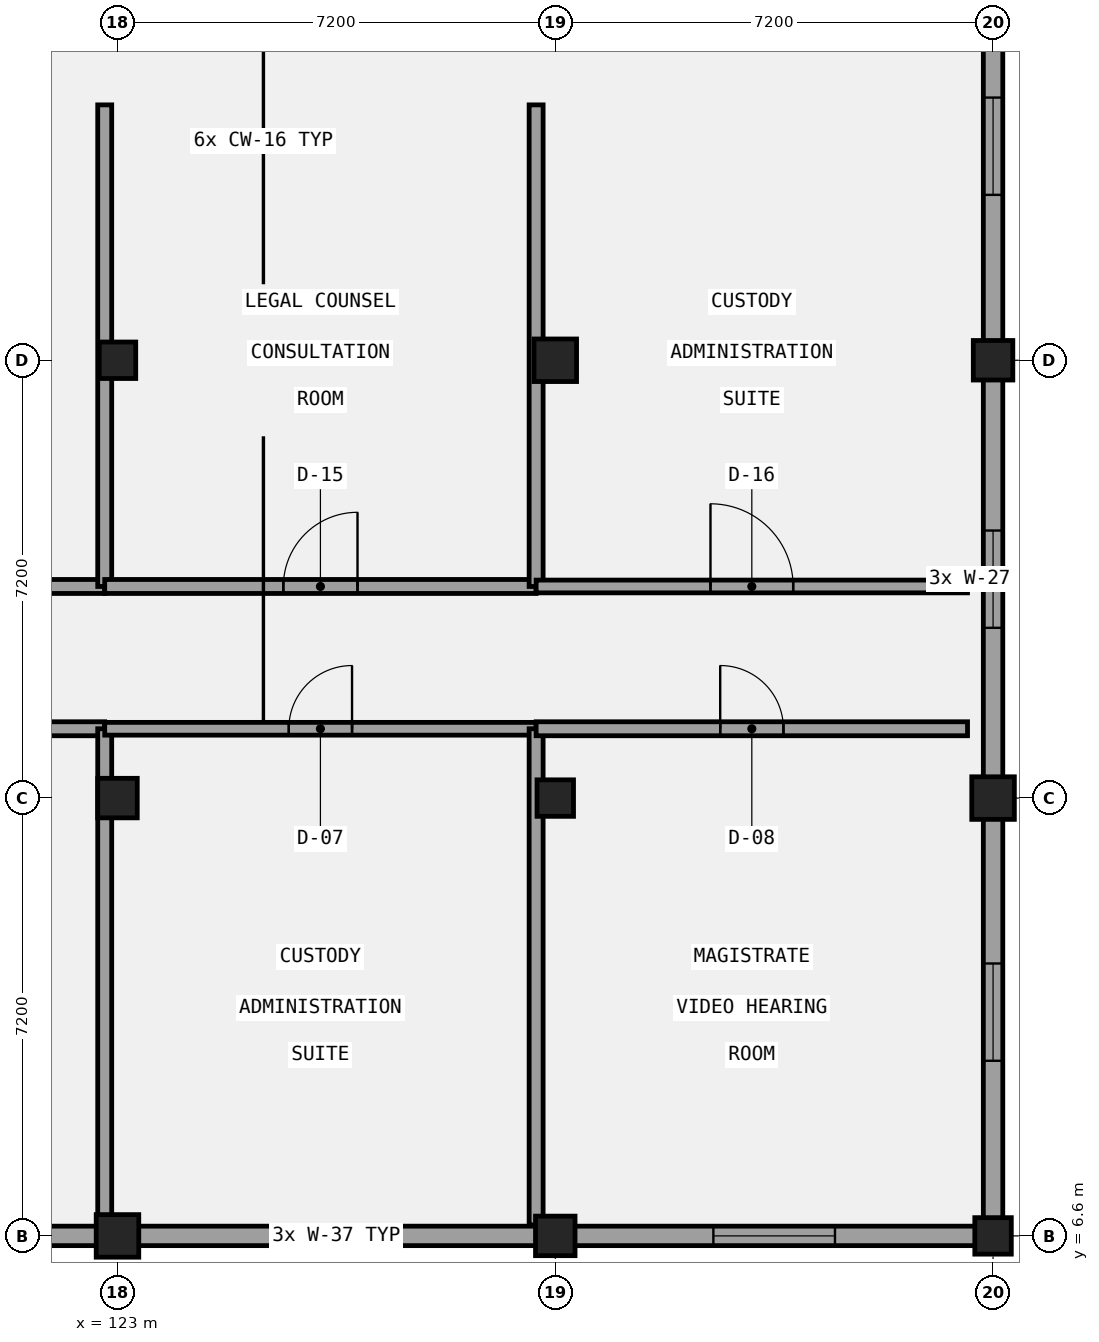
"""IFC4 building model, lengths in metres.
Left out: names, types, materials, properties, quantities, classifications, styles, units other than length and angle.
Written with IfcOpenShell. Run it as: python <this file> out.ifc"""

import sys

from ifc_helpers import new_model, si_unit, direction, frame, frame_2d, origin, origin_2d, place, context, subcontext, project, spatial, rectangle, extrude, element, fill, save


model = new_model("IFC4")
c1 = context("Model", 3, precision=1e-05, world=origin(), true_north=direction((0.0, 1.0)))
c2 = subcontext(c1, "Body", "Model", "MODEL_VIEW")
j1 = project(units=[si_unit("LENGTHUNIT", "METRE"), si_unit("PLANEANGLEUNIT", "RADIAN")], contexts=[c1])
p1 = place(None, origin())
s1 = spatial("IfcSite", under=j1, at=p1, CompositionType="ELEMENT")
p2 = place(p1, origin())
s2 = spatial("IfcBuilding", under=s1, at=p2, CompositionType="ELEMENT")
p3 = place(p2, frame((0.0, 0.0, 9.6)))
s3 = spatial("IfcBuildingStorey", under=s2, at=p3, CompositionType="ELEMENT", Elevation=9.6)
p4 = place(p3, frame((123.0, 6.6, 0.0), z_axis=(0.0, 0.0, 1.0), x_axis=(1.0, 0.0, 0.0)))
e1 = element("IfcColumn", 1, at=p4, inside=s3, PredefinedType="COLUMN", context=c2, shape_type="SweptSolid", body=[
    extrude(rectangle(XDim=0.7, YDim=0.7, at=origin_2d()), origin(), (0.0, 0.0, 1.0), 4.2),
])
p5 = place(p3, frame((123.0, 13.8, 0.0), z_axis=(0.0, 0.0, 1.0), x_axis=(1.0, 0.0, 0.0)))
e2 = element("IfcColumn", 2, at=p5, inside=s3, PredefinedType="COLUMN", context=c2, shape_type="SweptSolid", body=[
    extrude(rectangle(XDim=0.65, YDim=0.65, at=origin_2d()), origin(), (0.0, 0.0, 1.0), 4.2),
])
p6 = place(p3, frame((123.0, 21.0, 0.0), z_axis=(0.0, 0.0, 1.0), x_axis=(1.0, 0.0, 0.0)))
e3 = element("IfcColumn", 3, at=p6, inside=s3, PredefinedType="COLUMN", context=c2, shape_type="SweptSolid", body=[
    extrude(rectangle(XDim=0.6, YDim=0.6, at=origin_2d()), origin(), (0.0, 0.0, 1.0), 4.2),
])
p7 = place(p3, frame((130.2, 6.6, 0.0), z_axis=(0.0, 0.0, 1.0), x_axis=(1.0, 0.0, 0.0)))
e4 = element("IfcColumn", 4, at=p7, inside=s3, PredefinedType="COLUMN", context=c2, shape_type="SweptSolid", body=[
    extrude(rectangle(XDim=0.65, YDim=0.65, at=origin_2d()), origin(), (0.0, 0.0, 1.0), 4.2),
])
p8 = place(p3, frame((130.2, 13.8, 0.0), z_axis=(0.0, 0.0, 1.0), x_axis=(1.0, 0.0, 0.0)))
e5 = element("IfcColumn", 5, at=p8, inside=s3, PredefinedType="COLUMN", context=c2, shape_type="SweptSolid", body=[
    extrude(rectangle(XDim=0.6, YDim=0.6, at=origin_2d()), origin(), (0.0, 0.0, 1.0), 4.2),
])
p9 = place(p3, frame((130.2, 21.0, 0.0), z_axis=(0.0, 0.0, 1.0), x_axis=(1.0, 0.0, 0.0)))
e6 = element("IfcColumn", 6, at=p9, inside=s3, PredefinedType="COLUMN", context=c2, shape_type="SweptSolid", body=[
    extrude(rectangle(XDim=0.7, YDim=0.7, at=origin_2d()), origin(), (0.0, 0.0, 1.0), 4.2),
])
p10 = place(p3, frame((137.4, 6.6, 0.0), z_axis=(0.0, 0.0, 1.0), x_axis=(1.0, 0.0, 0.0)))
e7 = element("IfcColumn", 7, at=p10, inside=s3, PredefinedType="COLUMN", context=c2, shape_type="SweptSolid", body=[
    extrude(rectangle(XDim=0.6, YDim=0.6, at=origin_2d()), origin(), (0.0, 0.0, 1.0), 4.2),
])
p11 = place(p3, frame((137.4, 13.8, 0.0), z_axis=(0.0, 0.0, 1.0), x_axis=(1.0, 0.0, 0.0)))
e8 = element("IfcColumn", 8, at=p11, inside=s3, PredefinedType="COLUMN", context=c2, shape_type="SweptSolid", body=[
    extrude(rectangle(XDim=0.7, YDim=0.7, at=origin_2d()), origin(), (0.0, 0.0, 1.0), 4.2),
])
p12 = place(p3, frame((137.4, 21.0, 0.0), z_axis=(0.0, 0.0, 1.0), x_axis=(1.0, 0.0, 0.0)))
e9 = element("IfcColumn", 9, at=p12, inside=s3, PredefinedType="COLUMN", context=c2, shape_type="SweptSolid", body=[
    extrude(rectangle(XDim=0.65, YDim=0.65, at=origin_2d()), origin(), (0.0, 0.0, 1.0), 4.2),
])
p13 = place(p3, frame((79.64, 6.6, 0.0), z_axis=(0.0, 0.0, 1.0), x_axis=(1.0, 0.0, 0.0)))
e10 = element("IfcWall", 10, at=p13, inside=s3, PredefinedType="SOLIDWALL", context=c2, shape_type="SweptSolid", body=[
    extrude(rectangle(XDim=57.92, YDim=0.32, at=frame_2d((28.96, 0.0))), origin(), (0.0, 0.0, 1.0), 2.94),
])
p14 = place(p13, frame((2.76, 0.0, 1.0)))
e11 = element("IfcOpeningElement", 11, at=p14, cuts=e10, PredefinedType="OPENING", context=c2, shape_type="SweptSolid", body=[
    extrude(rectangle(XDim=2.0, YDim=1.65, at=frame_2d((1.0, 0.825))), frame((0.0, 0.17, 0.0), z_axis=(0.0, -1.0, 0.0), x_axis=(1.0, 0.0, 0.0)), (0.0, 0.0, 1.0), 0.34),
])
p15 = place(p13, frame((9.96, 0.0, 1.0)))
e12 = element("IfcOpeningElement", 12, at=p15, cuts=e10, PredefinedType="OPENING", context=c2, shape_type="SweptSolid", body=[
    extrude(rectangle(XDim=2.0, YDim=1.65, at=frame_2d((1.0, 0.825))), frame((0.0, 0.17, 0.0), z_axis=(0.0, -1.0, 0.0), x_axis=(1.0, 0.0, 0.0)), (0.0, 0.0, 1.0), 0.34),
])
p16 = place(p13, frame((17.16, 0.0, 1.0)))
e13 = element("IfcOpeningElement", 13, at=p16, cuts=e10, PredefinedType="OPENING", context=c2, shape_type="SweptSolid", body=[
    extrude(rectangle(XDim=2.0, YDim=1.65, at=frame_2d((1.0, 0.825))), frame((0.0, 0.17, 0.0), z_axis=(0.0, -1.0, 0.0), x_axis=(1.0, 0.0, 0.0)), (0.0, 0.0, 1.0), 0.34),
])
p17 = place(p13, frame((24.36, 0.0, 1.0)))
e14 = element("IfcOpeningElement", 14, at=p17, cuts=e10, PredefinedType="OPENING", context=c2, shape_type="SweptSolid", body=[
    extrude(rectangle(XDim=2.0, YDim=1.65, at=frame_2d((1.0, 0.825))), frame((0.0, 0.17, 0.0), z_axis=(0.0, -1.0, 0.0), x_axis=(1.0, 0.0, 0.0)), (0.0, 0.0, 1.0), 0.34),
])
p18 = place(p13, frame((31.56, 0.0, 1.0)))
e15 = element("IfcOpeningElement", 15, at=p18, cuts=e10, PredefinedType="OPENING", context=c2, shape_type="SweptSolid", body=[
    extrude(rectangle(XDim=2.0, YDim=1.65, at=frame_2d((1.0, 0.825))), frame((0.0, 0.17, 0.0), z_axis=(0.0, -1.0, 0.0), x_axis=(1.0, 0.0, 0.0)), (0.0, 0.0, 1.0), 0.34),
])
p19 = place(p13, frame((38.76, 0.0, 1.0)))
e16 = element("IfcOpeningElement", 16, at=p19, cuts=e10, PredefinedType="OPENING", context=c2, shape_type="SweptSolid", body=[
    extrude(rectangle(XDim=2.0, YDim=1.65, at=frame_2d((1.0, 0.825))), frame((0.0, 0.17, 0.0), z_axis=(0.0, -1.0, 0.0), x_axis=(1.0, 0.0, 0.0)), (0.0, 0.0, 1.0), 0.34),
])
p20 = place(p13, frame((45.96, 0.0, 1.0)))
e17 = element("IfcOpeningElement", 17, at=p20, cuts=e10, PredefinedType="OPENING", context=c2, shape_type="SweptSolid", body=[
    extrude(rectangle(XDim=2.0, YDim=1.65, at=frame_2d((1.0, 0.825))), frame((0.0, 0.17, 0.0), z_axis=(0.0, -1.0, 0.0), x_axis=(1.0, 0.0, 0.0)), (0.0, 0.0, 1.0), 0.34),
])
p21 = place(p13, frame((53.16, 0.0, 1.0)))
e18 = element("IfcOpeningElement", 18, at=p21, cuts=e10, PredefinedType="OPENING", context=c2, shape_type="SweptSolid", body=[
    extrude(rectangle(XDim=2.0, YDim=1.65, at=frame_2d((1.0, 0.825))), frame((0.0, 0.17, 0.0), z_axis=(0.0, -1.0, 0.0), x_axis=(1.0, 0.0, 0.0)), (0.0, 0.0, 1.0), 0.34),
])
p22 = place(p3, frame((137.4, 6.76, 0.0), z_axis=(0.0, 0.0, 1.0), x_axis=(0.0, 1.0, 0.0)))
e19 = element("IfcWall", 19, at=p22, inside=s3, PredefinedType="SOLIDWALL", context=c2, shape_type="SweptSolid", body=[
    extrude(rectangle(XDim=21.28, YDim=0.32, at=frame_2d((10.64, 0.0))), origin(), (0.0, 0.0, 1.0), 3.29),
])
p23 = place(p22, frame((2.72, 0.0, 1.0)))
e20 = element("IfcOpeningElement", 20, at=p23, cuts=e19, PredefinedType="OPENING", context=c2, shape_type="SweptSolid", body=[
    extrude(rectangle(XDim=1.6, YDim=1.65, at=frame_2d((0.8, 0.825))), frame((0.0, 0.17, 0.0), z_axis=(0.0, -1.0, 0.0), x_axis=(1.0, 0.0, 0.0)), (0.0, 0.0, 1.0), 0.34),
])
p24 = place(p22, frame((9.84, 0.0, 1.0)))
e21 = element("IfcOpeningElement", 21, at=p24, cuts=e19, PredefinedType="OPENING", context=c2, shape_type="SweptSolid", body=[
    extrude(rectangle(XDim=1.6, YDim=1.65, at=frame_2d((0.8, 0.825))), frame((0.0, 0.17, 0.0), z_axis=(0.0, -1.0, 0.0), x_axis=(1.0, 0.0, 0.0)), (0.0, 0.0, 1.0), 0.34),
])
p25 = place(p22, frame((16.96, 0.0, 1.0)))
e22 = element("IfcOpeningElement", 22, at=p25, cuts=e19, PredefinedType="OPENING", context=c2, shape_type="SweptSolid", body=[
    extrude(rectangle(XDim=1.6, YDim=1.65, at=frame_2d((0.8, 0.825))), frame((0.0, 0.17, 0.0), z_axis=(0.0, -1.0, 0.0), x_axis=(1.0, 0.0, 0.0)), (0.0, 0.0, 1.0), 0.34),
])
p26 = place(p3, frame((115.695, 14.94, 0.0), z_axis=(0.0, 0.0, 1.0), x_axis=(1.0, 0.0, 0.0)))
e23 = element("IfcWall", 23, at=p26, inside=s3, PredefinedType="PARTITIONING", context=c2, shape_type="SweptSolid", body=[
    extrude(rectangle(XDim=7.095, YDim=0.23, at=frame_2d((3.547, 0.0))), origin(), (0.0, 0.0, 1.0), 3.94),
])
p27 = place(p26, frame((3.058, 0.0, 0.0)))
e24 = element("IfcOpeningElement", 24, at=p27, cuts=e23, PredefinedType="OPENING", context=c2, shape_type="SweptSolid", body=[
    extrude(rectangle(XDim=0.98, YDim=2.35, at=frame_2d((0.49, 1.175))), frame((0.0, 0.125, 0.0), z_axis=(0.0, -1.0, 0.0), x_axis=(1.0, 0.0, 0.0)), (0.0, 0.0, 1.0), 0.25),
])
p28 = place(p3, frame((122.79, 6.78, 0.0), z_axis=(0.0, 0.0, 1.0), x_axis=(0.0, 1.0, 0.0)))
e25 = element("IfcWall", 25, at=p28, inside=s3, PredefinedType="PARTITIONING", context=c2, shape_type="SweptSolid", body=[
    extrude(rectangle(XDim=8.16, YDim=0.23, at=frame_2d((4.08, 0.0))), origin(), (0.0, 0.0, 1.0), 2.94),
])
p29 = place(p3, frame((122.79, 14.94, 0.0), z_axis=(0.0, 0.0, 1.0), x_axis=(1.0, 0.0, 0.0)))
e26 = element("IfcWall", 26, at=p29, inside=s3, PredefinedType="PARTITIONING", context=c2, shape_type="SweptSolid", body=[
    extrude(rectangle(XDim=7.095, YDim=0.21, at=frame_2d((3.547, 0.0))), origin(), (0.0, 0.0, 1.0), 3.94),
])
p30 = place(p29, frame((3.028, 0.0, 0.0)))
e27 = element("IfcOpeningElement", 27, at=p30, cuts=e26, PredefinedType="OPENING", context=c2, shape_type="SweptSolid", body=[
    extrude(rectangle(XDim=1.04, YDim=2.1, at=frame_2d((0.52, 1.05))), frame((0.0, 0.115, 0.0), z_axis=(0.0, -1.0, 0.0), x_axis=(1.0, 0.0, 0.0)), (0.0, 0.0, 1.0), 0.23),
])
p31 = place(p3, frame((129.885, 6.78, 0.0), z_axis=(0.0, 0.0, 1.0), x_axis=(0.0, 1.0, 0.0)))
e28 = element("IfcWall", 28, at=p31, inside=s3, PredefinedType="PARTITIONING", context=c2, shape_type="SweptSolid", body=[
    extrude(rectangle(XDim=8.16, YDim=0.23, at=frame_2d((4.08, 0.0))), origin(), (0.0, 0.0, 1.0), 2.94),
])
p32 = place(p3, frame((129.885, 14.94, 0.0), z_axis=(0.0, 0.0, 1.0), x_axis=(1.0, 0.0, 0.0)))
e29 = element("IfcWall", 29, at=p32, inside=s3, PredefinedType="PARTITIONING", context=c2, shape_type="SweptSolid", body=[
    extrude(rectangle(XDim=7.095, YDim=0.23, at=frame_2d((3.547, 0.0))), origin(), (0.0, 0.0, 1.0), 3.94),
])
p33 = place(p32, frame((3.028, 0.0, 0.0)))
e30 = element("IfcOpeningElement", 30, at=p33, cuts=e29, PredefinedType="OPENING", context=c2, shape_type="SweptSolid", body=[
    extrude(rectangle(XDim=1.04, YDim=2.22, at=frame_2d((0.52, 1.11))), frame((0.0, 0.125, 0.0), z_axis=(0.0, -1.0, 0.0), x_axis=(1.0, 0.0, 0.0)), (0.0, 0.0, 1.0), 0.25),
])
p34 = place(p3, frame((115.695, 17.28, 0.0), z_axis=(0.0, 0.0, 1.0), x_axis=(1.0, 0.0, 0.0)))
e31 = element("IfcWall", 31, at=p34, inside=s3, PredefinedType="PARTITIONING", context=c2, shape_type="SweptSolid", body=[
    extrude(rectangle(XDim=7.095, YDim=0.23, at=frame_2d((3.547, 0.0))), origin(), (0.0, 0.0, 1.0), 3.39),
])
p35 = place(p34, frame((2.938, 0.0, 0.0)))
e32 = element("IfcOpeningElement", 32, at=p35, cuts=e31, PredefinedType="OPENING", context=c2, shape_type="SweptSolid", body=[
    extrude(rectangle(XDim=1.22, YDim=2.22, at=frame_2d((0.61, 1.11))), frame((0.0, 0.125, 0.0), z_axis=(0.0, -1.0, 0.0), x_axis=(1.0, 0.0, 0.0)), (0.0, 0.0, 1.0), 0.25),
])
p36 = place(p3, frame((122.79, 17.28, 0.0), z_axis=(0.0, 0.0, 1.0), x_axis=(0.0, 1.0, 0.0)))
e33 = element("IfcWall", 33, at=p36, inside=s3, PredefinedType="PARTITIONING", context=c2, shape_type="SweptSolid", body=[
    extrude(rectangle(XDim=7.92, YDim=0.23, at=frame_2d((3.96, 0.0))), origin(), (0.0, 0.0, 1.0), 2.94),
])
p37 = place(p3, frame((122.79, 17.28, 0.0), z_axis=(0.0, 0.0, 1.0), x_axis=(1.0, 0.0, 0.0)))
e34 = element("IfcWall", 34, at=p37, inside=s3, PredefinedType="PARTITIONING", context=c2, shape_type="SweptSolid", body=[
    extrude(rectangle(XDim=7.095, YDim=0.23, at=frame_2d((3.547, 0.0))), origin(), (0.0, 0.0, 1.0), 3.39),
])
p38 = place(p37, frame((2.938, 0.0, 0.0)))
e35 = element("IfcOpeningElement", 35, at=p38, cuts=e34, PredefinedType="OPENING", context=c2, shape_type="SweptSolid", body=[
    extrude(rectangle(XDim=1.22, YDim=2.35, at=frame_2d((0.61, 1.175))), frame((0.0, 0.125, 0.0), z_axis=(0.0, -1.0, 0.0), x_axis=(1.0, 0.0, 0.0)), (0.0, 0.0, 1.0), 0.25),
])
p39 = place(p3, frame((129.885, 17.28, 0.0), z_axis=(0.0, 0.0, 1.0), x_axis=(0.0, 1.0, 0.0)))
e36 = element("IfcWall", 36, at=p39, inside=s3, PredefinedType="PARTITIONING", context=c2, shape_type="SweptSolid", body=[
    extrude(rectangle(XDim=7.92, YDim=0.23, at=frame_2d((3.96, 0.0))), origin(), (0.0, 0.0, 1.0), 3.34),
])
p40 = place(p3, frame((129.885, 17.28, 0.0), z_axis=(0.0, 0.0, 1.0), x_axis=(1.0, 0.0, 0.0)))
e37 = element("IfcWall", 37, at=p40, inside=s3, PredefinedType="PARTITIONING", context=c2, shape_type="SweptSolid", body=[
    extrude(rectangle(XDim=7.095, YDim=0.21, at=frame_2d((3.547, 0.0))), origin(), (0.0, 0.0, 1.0), 3.39),
])
p41 = place(p40, frame((2.867, 0.0, 0.0)))
e38 = element("IfcOpeningElement", 38, at=p41, cuts=e37, PredefinedType="OPENING", context=c2, shape_type="SweptSolid", body=[
    extrude(rectangle(XDim=1.36, YDim=2.1, at=frame_2d((0.68, 1.05))), frame((0.0, 0.115, 0.0), z_axis=(0.0, -1.0, 0.0), x_axis=(1.0, 0.0, 0.0)), (0.0, 0.0, 1.0), 0.23),
])
p42 = place(p20, origin())
e39 = element("IfcWindow", 39, at=p42, inside=s3, PartitioningType="SINGLE_PANEL", PredefinedType="WINDOW", context=c2, shape_type="SweptSolid", body=[
    extrude(rectangle(XDim=2.0, YDim=1.65, at=frame_2d((1.0, 0.825))), frame((0.0, 0.03, 0.0), z_axis=(0.0, -1.0, 0.0), x_axis=(1.0, 0.0, 0.0)), (0.0, 0.0, 1.0), 0.06),
])
fill(e17, e39)
p43 = place(p21, origin())
e40 = element("IfcWindow", 40, at=p43, inside=s3, PartitioningType="SINGLE_PANEL", PredefinedType="WINDOW", context=c2, shape_type="SweptSolid", body=[
    extrude(rectangle(XDim=2.0, YDim=1.65, at=frame_2d((1.0, 0.825))), frame((0.0, 0.03, 0.0), z_axis=(0.0, -1.0, 0.0), x_axis=(1.0, 0.0, 0.0)), (0.0, 0.0, 1.0), 0.06),
])
fill(e18, e40)
p44 = place(p23, origin())
e41 = element("IfcWindow", 41, at=p44, inside=s3, PartitioningType="SINGLE_PANEL", PredefinedType="WINDOW", context=c2, shape_type="SweptSolid", body=[
    extrude(rectangle(XDim=1.6, YDim=1.65, at=frame_2d((0.8, 0.825))), frame((0.0, 0.03, 0.0), z_axis=(0.0, -1.0, 0.0), x_axis=(1.0, 0.0, 0.0)), (0.0, 0.0, 1.0), 0.06),
])
fill(e20, e41)
p45 = place(p24, origin())
e42 = element("IfcWindow", 42, at=p45, inside=s3, PartitioningType="SINGLE_PANEL", PredefinedType="WINDOW", context=c2, shape_type="SweptSolid", body=[
    extrude(rectangle(XDim=1.6, YDim=1.65, at=frame_2d((0.8, 0.825))), frame((0.0, 0.03, 0.0), z_axis=(0.0, -1.0, 0.0), x_axis=(1.0, 0.0, 0.0)), (0.0, 0.0, 1.0), 0.06),
])
fill(e21, e42)
p46 = place(p25, origin())
e43 = element("IfcWindow", 43, at=p46, inside=s3, PartitioningType="SINGLE_PANEL", PredefinedType="WINDOW", context=c2, shape_type="SweptSolid", body=[
    extrude(rectangle(XDim=1.6, YDim=1.65, at=frame_2d((0.8, 0.825))), frame((0.0, 0.03, 0.0), z_axis=(0.0, -1.0, 0.0), x_axis=(1.0, 0.0, 0.0)), (0.0, 0.0, 1.0), 0.06),
])
fill(e22, e43)
p47 = place(p30, frame((1.04, 0.0, 0.0), z_axis=(0.0, 0.0, 1.0), x_axis=(-1.0, 0.0, 0.0)))
e44 = element("IfcDoor", 44, at=p47, inside=s3, OperationType="SINGLE_SWING_RIGHT", PredefinedType="DOOR", context=c2, shape_type="SweptSolid", body=[
    extrude(rectangle(XDim=1.04, YDim=2.1, at=frame_2d((0.52, 1.05))), frame((0.0, 0.025, 0.0), z_axis=(0.0, -1.0, 0.0), x_axis=(1.0, 0.0, 0.0)), (0.0, 0.0, 1.0), 0.05),
])
fill(e27, e44)
p48 = place(p33, frame((1.04, 0.0, 0.0), z_axis=(0.0, 0.0, 1.0), x_axis=(-1.0, 0.0, 0.0)))
e45 = element("IfcDoor", 45, at=p48, inside=s3, OperationType="SINGLE_SWING_LEFT", PredefinedType="DOOR", context=c2, shape_type="SweptSolid", body=[
    extrude(rectangle(XDim=1.04, YDim=2.22, at=frame_2d((0.52, 1.11))), frame((0.0, 0.025, 0.0), z_axis=(0.0, -1.0, 0.0), x_axis=(1.0, 0.0, 0.0)), (0.0, 0.0, 1.0), 0.05),
])
fill(e30, e45)
p49 = place(p38, origin())
e46 = element("IfcDoor", 46, at=p49, inside=s3, OperationType="SINGLE_SWING_RIGHT", PredefinedType="DOOR", context=c2, shape_type="SweptSolid", body=[
    extrude(rectangle(XDim=1.22, YDim=2.35, at=frame_2d((0.61, 1.175))), frame((0.0, 0.025, 0.0), z_axis=(0.0, -1.0, 0.0), x_axis=(1.0, 0.0, 0.0)), (0.0, 0.0, 1.0), 0.05),
])
fill(e35, e46)
p50 = place(p41, origin())
e47 = element("IfcDoor", 47, at=p50, inside=s3, OperationType="SINGLE_SWING_LEFT", PredefinedType="DOOR", context=c2, shape_type="SweptSolid", body=[
    extrude(rectangle(XDim=1.36, YDim=2.1, at=frame_2d((0.68, 1.05))), frame((0.0, 0.025, 0.0), z_axis=(0.0, -1.0, 0.0), x_axis=(1.0, 0.0, 0.0)), (0.0, 0.0, 1.0), 0.05),
])
fill(e38, e47)
save(model, sys.argv[1])
